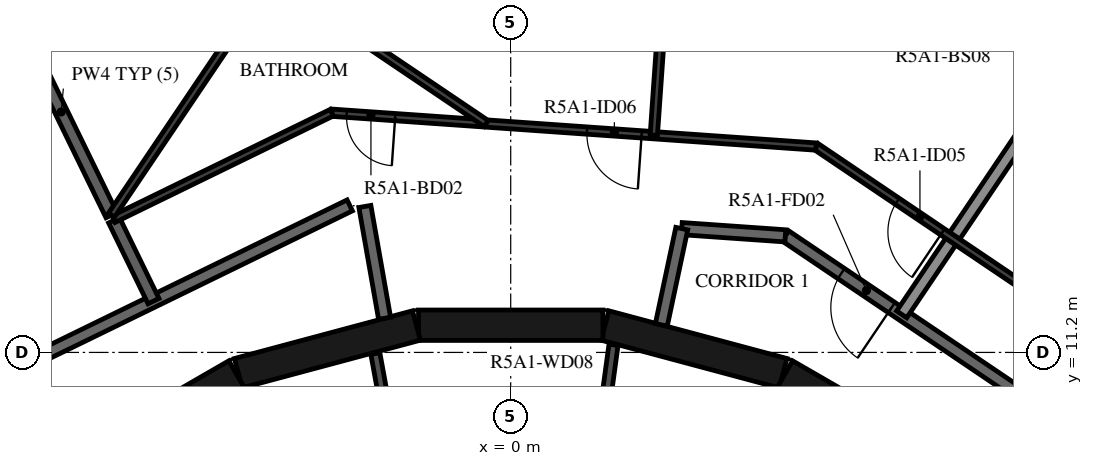
"""IFC4 building model, lengths in metres.
Left out: names, types, materials, properties, quantities, classifications, styles, units other than length and angle.
Written with IfcOpenShell. Run it as: python <this file> out.ifc"""

import sys

from ifc_helpers import new_model, si_unit, direction, frame, frame_2d, origin, place, context, subcontext, project, spatial, rectangle, extrude, element, fill, save


model = new_model("IFC4")
c1 = context("Model", 3, precision=1e-05, world=origin(), true_north=direction((0.0, 1.0)))
c2 = subcontext(c1, "Body", "Model", "MODEL_VIEW")
j1 = project(units=[si_unit("LENGTHUNIT", "METRE"), si_unit("PLANEANGLEUNIT", "RADIAN")], contexts=[c1])
p1 = place(None, origin())
s1 = spatial("IfcSite", under=j1, at=p1, CompositionType="ELEMENT")
p2 = place(p1, origin())
s2 = spatial("IfcBuilding", under=s1, at=p2, CompositionType="ELEMENT")
p3 = place(p2, frame((0.0, 0.0, 191.9)))
s3 = spatial("IfcBuildingStorey", under=s2, at=p3, CompositionType="ELEMENT", Elevation=191.9)
p4 = place(p3, frame((7.137, 9.329, 0.0), z_axis=(0.0, 0.0, 1.0), x_axis=(-0.865975092491, 0.500087131594, 0.0)))
e1 = element("IfcWall", 1, at=p4, inside=s3, PredefinedType="SHEAR", context=c2, shape_type="SweptSolid", body=[
    extrude(rectangle(XDim=3.033, YDim=0.5, at=frame_2d((1.516, 0.0))), origin(), (0.0, 0.0, 1.0), 3.12),
])
p5 = place(p4, frame((1.066, 0.0, 0.0)))
e2 = element("IfcOpeningElement", 2, at=p5, cuts=e1, PredefinedType="OPENING", context=c2, shape_type="SweptSolid", body=[
    extrude(rectangle(XDim=0.9, YDim=2.1, at=frame_2d((0.45, 1.05))), frame((0.0, 0.26, 0.0), z_axis=(0.0, -1.0, 0.0), x_axis=(1.0, 0.0, 0.0)), (0.0, 0.0, 1.0), 0.52),
])
for number, where, z_axis, x_axis in (
    (3, (4.479, 10.858, 0.0), (0.0, 0.0, 1.0), (-0.966, 0.259, 0.0)),
    (4, (1.516, 11.647, 0.0), (0.0, 0.0, 1.0), (-1.0, 0.0, 0.0)),
    (5, (-1.55, 11.643, 0.0), (0.0, 0.0, 1.0), (-0.966, -0.259, 0.0)),
    (6, (-4.51, 10.845, 0.0), (0.0, 0.0, 1.0), (-0.866, -0.5, 0.0)),
):
    element("IfcWall", number, at=place(p3, frame(where, z_axis=z_axis, x_axis=x_axis)), inside=s3, PredefinedType="SHEAR", context=c2, shape_type="SweptSolid", body=[
        extrude(rectangle(XDim=3.033, YDim=0.5, at=frame_2d((1.516, 0.0))), origin(), (0.0, 0.0, 1.0), 3.12),
    ])
p6 = place(p3, frame((1.691, 11.326, 0.0), z_axis=(0.0, 0.0, 1.0), x_axis=(-0.135344253201, -0.990798633994, 0.0)))
e7 = element("IfcWall", 7, at=p6, inside=s3, PredefinedType="PARTITIONING", context=c2, shape_type="SweptSolid", body=[
    extrude(rectangle(XDim=2.358, YDim=0.15, at=frame_2d((1.179, 0.0))), origin(), (0.0, 0.0, 1.0), 3.12),
])
p7 = place(p6, frame((0.729, 0.0, 0.0)))
e8 = element("IfcOpeningElement", 8, at=p7, cuts=e7, PredefinedType="OPENING", context=c2, shape_type="SweptSolid", body=[
    extrude(rectangle(XDim=0.9, YDim=2.1, at=frame_2d((0.45, 1.05))), frame((0.0, 0.085, 0.0), z_axis=(0.0, -1.0, 0.0), x_axis=(1.0, 0.0, 0.0)), (0.0, 0.0, 1.0), 0.17),
])
p8 = place(p3, frame((-1.825, 8.99, 0.0), z_axis=(0.0, 0.0, 1.0), x_axis=(-0.179955206115, 0.983674805915, 0.0)))
e9 = element("IfcWall", 9, at=p8, inside=s3, PredefinedType="PARTITIONING", context=c2, shape_type="SweptSolid", body=[
    extrude(rectangle(XDim=2.229, YDim=0.15, at=frame_2d((1.115, 0.0))), origin(), (0.0, 0.0, 1.0), 3.12),
])
p9 = place(p8, frame((0.665, 0.0, 0.0)))
e10 = element("IfcOpeningElement", 10, at=p9, cuts=e9, PredefinedType="OPENING", context=c2, shape_type="SweptSolid", body=[
    extrude(rectangle(XDim=0.9, YDim=2.1, at=frame_2d((0.45, 1.05))), frame((0.0, 0.085, 0.0), z_axis=(0.0, -1.0, 0.0), x_axis=(1.0, 0.0, 0.0)), (0.0, 0.0, 1.0), 0.17),
])
p10 = place(p3, frame((10.47, 9.101, 0.0), z_axis=(0.0, 0.0, 1.0), x_axis=(-0.829035841718, 0.559195469534, 0.0)))
e11 = element("IfcWall", 11, at=p10, inside=s3, PredefinedType="STANDARD", context=c2, shape_type="SweptSolid", body=[
    extrude(rectangle(XDim=7.181, YDim=0.2, at=frame_2d((3.591, 0.0))), origin(), (0.0, 0.0, 1.0), 3.12),
])
p11 = place(p10, frame((0.2, 0.0, 0.0)))
e12 = element("IfcOpeningElement", 12, at=p11, cuts=e11, PredefinedType="OPENING", context=c2, shape_type="SweptSolid", body=[
    extrude(rectangle(XDim=1.0, YDim=2.1, at=frame_2d((0.5, 1.05))), frame((0.0, 0.11, 0.0), z_axis=(0.0, -1.0, 0.0), x_axis=(1.0, 0.0, 0.0)), (0.0, 0.0, 1.0), 0.22),
])
p12 = place(p10, frame((5.073, 0.0, 0.0)))
e13 = element("IfcOpeningElement", 13, at=p12, cuts=e11, PredefinedType="OPENING", context=c2, shape_type="SweptSolid", body=[
    extrude(rectangle(XDim=1.0, YDim=2.1, at=frame_2d((0.5, 1.05))), frame((0.0, 0.11, 0.0), z_axis=(0.0, -1.0, 0.0), x_axis=(1.0, 0.0, 0.0)), (0.0, 0.0, 1.0), 0.22),
])
p13 = place(p3, frame((4.517, 13.117, 0.0), z_axis=(0.0, 0.0, 1.0), x_axis=(-0.997562153664, 0.069783591025, 0.0)))
e14 = element("IfcWall", 14, at=p13, inside=s3, PredefinedType="STANDARD", context=c2, shape_type="SweptSolid", body=[
    extrude(rectangle(XDim=1.707, YDim=0.2, at=frame_2d((0.854, 0.0))), origin(), (0.0, 0.0, 1.0), 3.12),
])
p14 = place(p3, frame((2.813, 13.236, 0.0), z_axis=(0.0, 0.0, 1.0), x_axis=(-0.207911086063, -0.978147729278, 0.0)))
e15 = element("IfcWall", 15, at=p14, inside=s3, PredefinedType="STANDARD", context=c2, shape_type="SweptSolid", body=[
    extrude(rectangle(XDim=1.618, YDim=0.2, at=frame_2d((0.809, 0.0))), origin(), (0.0, 0.0, 1.0), 3.12),
])
p15 = place(p3, frame((-2.074, 11.761, 0.0), z_axis=(0.0, 0.0, 1.0), x_axis=(-0.173740587112, 0.984791454263, 0.0)))
e16 = element("IfcWall", 16, at=p15, inside=s3, PredefinedType="STANDARD", context=c2, shape_type="SweptSolid", body=[
    extrude(rectangle(XDim=1.867, YDim=0.2, at=frame_2d((0.934, 0.0))), origin(), (0.0, 0.0, 1.0), 3.12),
])
p16 = place(p3, frame((-2.647, 13.618, 0.0), z_axis=(0.0, 0.0, 1.0), x_axis=(-0.898796543751, -0.438366026218, 0.0)))
e17 = element("IfcWall", 17, at=p16, inside=s3, PredefinedType="STANDARD", context=c2, shape_type="SweptSolid", body=[
    extrude(rectangle(XDim=7.181, YDim=0.2, at=frame_2d((3.591, 0.0))), origin(), (0.0, 0.0, 1.0), 3.12),
])
p17 = place(p3, frame((9.104, 15.79, 0.0), z_axis=(0.0, 0.0, 1.0), x_axis=(-0.559193912135, -0.829036892201, 0.0)))
e18 = element("IfcWall", 18, at=p17, inside=s3, PredefinedType="STANDARD", context=c2, shape_type="SweptSolid", body=[
    extrude(rectangle(XDim=4.781, YDim=0.2, at=frame_2d((2.39, 0.0))), origin(), (0.0, 0.0, 1.0), 2.73),
])
p18 = place(p3, frame((-6.522, 13.373, 0.0), z_axis=(0.0, 0.0, 1.0), x_axis=(0.438277270821, -0.8988398266, 0.0)))
e19 = element("IfcWall", 19, at=p18, inside=s3, PredefinedType="STANDARD", context=c2, shape_type="SweptSolid", body=[
    extrude(rectangle(XDim=1.479, YDim=0.2, at=frame_2d((0.74, 0.0))), origin(), (0.0, 0.0, 1.0), 3.12),
])
p19 = place(p3, frame((-8.219, 16.851, 0.0), z_axis=(0.0, 0.0, 1.0), x_axis=(0.438291091101, -0.898833087654, 0.0)))
e20 = element("IfcWall", 20, at=p19, inside=s3, PredefinedType="STANDARD", context=c2, shape_type="SweptSolid", body=[
    extrude(rectangle(XDim=3.774, YDim=0.2, at=frame_2d((1.887, 0.0))), origin(), (0.0, 0.0, 1.0), 3.12),
])
p20 = place(p3, frame((11.642, 10.12, 0.0), z_axis=(0.0, 0.0, 1.0), x_axis=(-0.829032241779, 0.55920080659, 0.0)))
e21 = element("IfcWall", 21, at=p20, inside=s3, PredefinedType="PARTITIONING", context=c2, shape_type="SweptSolid", body=[
    extrude(rectangle(XDim=7.985, YDim=0.12, at=frame_2d((3.992, 0.0))), origin(), (0.0, 0.0, 1.0), 3.12),
])
p21 = place(p20, frame((0.2, 0.0, 0.0)))
e22 = element("IfcOpeningElement", 22, at=p21, cuts=e21, PredefinedType="OPENING", context=c2, shape_type="SweptSolid", body=[
    extrude(rectangle(XDim=0.9, YDim=2.1, at=frame_2d((0.45, 1.05))), frame((0.0, 0.07, 0.0), z_axis=(0.0, -1.0, 0.0), x_axis=(1.0, 0.0, 0.0)), (0.0, 0.0, 1.0), 0.14),
])
p22 = place(p20, frame((5.475, 0.0, 0.0)))
e23 = element("IfcOpeningElement", 23, at=p22, cuts=e21, PredefinedType="OPENING", context=c2, shape_type="SweptSolid", body=[
    extrude(rectangle(XDim=0.9, YDim=2.1, at=frame_2d((0.45, 1.05))), frame((0.0, 0.07, 0.0), z_axis=(0.0, -1.0, 0.0), x_axis=(1.0, 0.0, 0.0)), (0.0, 0.0, 1.0), 0.14),
])
p23 = place(p3, frame((5.022, 14.585, 0.0), z_axis=(0.0, 0.0, 1.0), x_axis=(-0.997565118395, 0.069741197017, 0.0)))
e24 = element("IfcWall", 24, at=p23, inside=s3, PredefinedType="PARTITIONING", context=c2, shape_type="SweptSolid", body=[
    extrude(rectangle(XDim=7.985, YDim=0.12, at=frame_2d((3.993, 0.0))), origin(), (0.0, 0.0, 1.0), 3.12),
])
p24 = place(p23, frame((2.875, 0.0, 0.0)))
e25 = element("IfcOpeningElement", 25, at=p24, cuts=e24, PredefinedType="OPENING", context=c2, shape_type="SweptSolid", body=[
    extrude(rectangle(XDim=0.9, YDim=2.1, at=frame_2d((0.45, 1.05))), frame((0.0, 0.07, 0.0), z_axis=(0.0, -1.0, 0.0), x_axis=(1.0, 0.0, 0.0)), (0.0, 0.0, 1.0), 0.14),
])
p25 = place(p23, frame((6.938, 0.0, 0.0)))
e26 = element("IfcOpeningElement", 26, at=p25, cuts=e24, PredefinedType="OPENING", context=c2, shape_type="SweptSolid", body=[
    extrude(rectangle(XDim=0.8, YDim=2.1, at=frame_2d((0.4, 1.05))), frame((0.0, 0.07, 0.0), z_axis=(0.0, -1.0, 0.0), x_axis=(1.0, 0.0, 0.0)), (0.0, 0.0, 1.0), 0.14),
])
p26 = place(p3, frame((-2.943, 15.142, 0.0), z_axis=(0.0, 0.0, 1.0), x_axis=(-0.89881075705, -0.438336883014, 0.0)))
e27 = element("IfcWall", 27, at=p26, inside=s3, PredefinedType="PARTITIONING", context=c2, shape_type="SweptSolid", body=[
    extrude(rectangle(XDim=3.992, YDim=0.12, at=frame_2d((1.996, 0.0))), origin(), (0.0, 0.0, 1.0), 3.12),
])
p27 = place(p3, frame((2.725, 20.092, 0.0), z_axis=(0.0, 0.0, 1.0), x_axis=(-0.069766716578, -0.997563333958, 0.0)))
e28 = element("IfcWall", 28, at=p27, inside=s3, PredefinedType="PARTITIONING", context=c2, shape_type="SweptSolid", body=[
    extrude(rectangle(XDim=5.333, YDim=0.12, at=frame_2d((2.667, 0.0))), origin(), (0.0, 0.0, 1.0), 3.12),
])
p28 = place(p3, frame((-7.476, 19.735, 0.0), z_axis=(0.0, 0.0, 1.0), x_axis=(0.829035412992, -0.559196105142, 0.0)))
e29 = element("IfcWall", 29, at=p28, inside=s3, PredefinedType="PARTITIONING", context=c2, shape_type="SweptSolid", body=[
    extrude(rectangle(XDim=8.531, YDim=0.12, at=frame_2d((4.266, 0.0))), origin(), (0.0, 0.0, 1.0), 3.12),
])
p29 = place(p28, frame((2.204, 0.0, 0.0)))
e30 = element("IfcOpeningElement", 30, at=p29, cuts=e29, PredefinedType="OPENING", context=c2, shape_type="SweptSolid", body=[
    extrude(rectangle(XDim=0.9, YDim=2.1, at=frame_2d((0.45, 1.05))), frame((0.0, 0.07, 0.0), z_axis=(0.0, -1.0, 0.0), x_axis=(1.0, 0.0, 0.0)), (0.0, 0.0, 1.0), 0.14),
])
p30 = place(p3, frame((-3.939, 17.35, 0.0), z_axis=(0.0, 0.0, 1.0), x_axis=(-0.559193216274, -0.829037361566, 0.0)))
e31 = element("IfcWall", 31, at=p30, inside=s3, PredefinedType="PARTITIONING", context=c2, shape_type="SweptSolid", body=[
    extrude(rectangle(XDim=4.694, YDim=0.12, at=frame_2d((2.347, 0.0))), origin(), (0.0, 0.0, 1.0), 3.12),
])
p31 = place(p12, origin())
e32 = element("IfcDoor", 32, at=p31, inside=s3, OperationType="SINGLE_SWING_RIGHT", PredefinedType="DOOR", context=c2, shape_type="SweptSolid", body=[
    extrude(rectangle(XDim=1.0, YDim=2.1, at=frame_2d((0.5, 1.05))), frame((0.0, 0.025, 0.0), z_axis=(0.0, -1.0, 0.0), x_axis=(1.0, 0.0, 0.0)), (0.0, 0.0, 1.0), 0.05),
])
fill(e13, e32)
p32 = place(p22, origin())
e33 = element("IfcDoor", 33, at=p32, inside=s3, OperationType="SINGLE_SWING_RIGHT", PredefinedType="DOOR", context=c2, shape_type="SweptSolid", body=[
    extrude(rectangle(XDim=0.9, YDim=2.1, at=frame_2d((0.45, 1.05))), frame((0.0, 0.025, 0.0), z_axis=(0.0, -1.0, 0.0), x_axis=(1.0, 0.0, 0.0)), (0.0, 0.0, 1.0), 0.05),
])
fill(e23, e33)
p33 = place(p24, origin())
e34 = element("IfcDoor", 34, at=p33, inside=s3, OperationType="SINGLE_SWING_RIGHT", PredefinedType="DOOR", context=c2, shape_type="SweptSolid", body=[
    extrude(rectangle(XDim=0.9, YDim=2.1, at=frame_2d((0.45, 1.05))), frame((0.0, 0.025, 0.0), z_axis=(0.0, -1.0, 0.0), x_axis=(1.0, 0.0, 0.0)), (0.0, 0.0, 1.0), 0.05),
])
fill(e25, e34)
p34 = place(p25, origin())
e35 = element("IfcDoor", 35, at=p34, inside=s3, OperationType="SINGLE_SWING_RIGHT", PredefinedType="DOOR", context=c2, shape_type="SweptSolid", body=[
    extrude(rectangle(XDim=0.8, YDim=2.1, at=frame_2d((0.4, 1.05))), frame((0.0, 0.025, 0.0), z_axis=(0.0, -1.0, 0.0), x_axis=(1.0, 0.0, 0.0)), (0.0, 0.0, 1.0), 0.05),
])
fill(e26, e35)
save(model, sys.argv[1])
